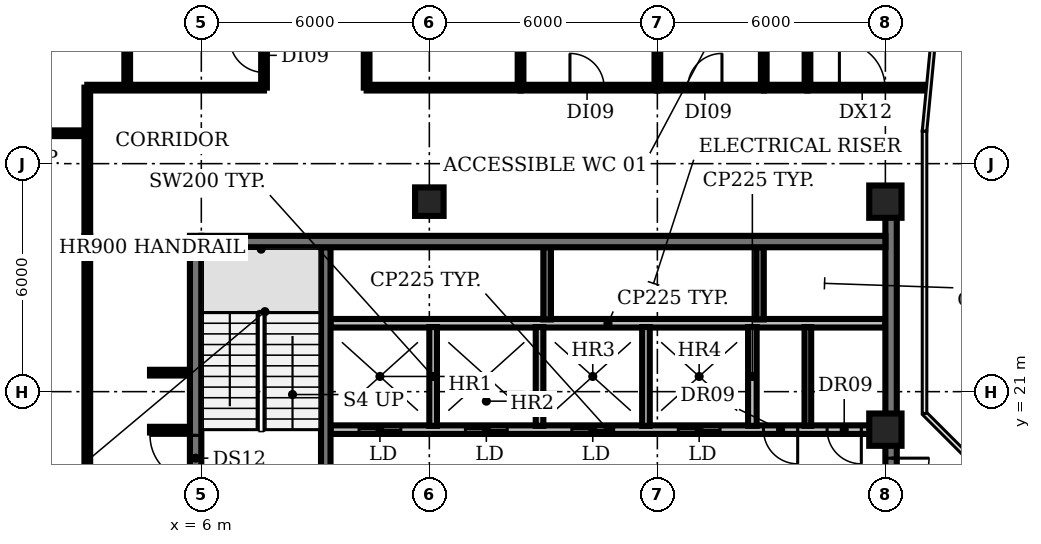
"""IFC4 building model, lengths in metres.
Left out: names, types, materials, properties, quantities, classifications, styles, units other than length and angle.
Written with IfcOpenShell. Run it as: python <this file> out.ifc"""

import sys

from ifc_helpers import new_model, si_unit, direction, frame, frame_2d, origin, origin_2d, place, context, subcontext, project, spatial, rectangle, circle, extrude, element, fill, save


model = new_model("IFC4")
c1 = context("Model", 3, precision=1e-05, world=origin(), true_north=direction((0.0, 1.0)))
c2 = subcontext(c1, "Body", "Model", "MODEL_VIEW")
j1 = project(units=[si_unit("LENGTHUNIT", "METRE"), si_unit("PLANEANGLEUNIT", "RADIAN")], contexts=[c1])
p1 = place(None, origin())
s1 = spatial("IfcSite", under=j1, at=p1, CompositionType="ELEMENT")
p2 = place(p1, origin())
s2 = spatial("IfcBuilding", under=s1, at=p2, CompositionType="ELEMENT")
p3 = place(p2, frame((0.0, 0.0, 264.2)))
s3 = spatial("IfcBuildingStorey", under=s2, at=p3, CompositionType="ELEMENT", Elevation=264.2)
p4 = place(p3, frame((12.0, 26.0, -0.35), z_axis=(0.0, 0.0, 1.0), x_axis=(1.0, 0.0, 0.0)))
e1 = element("IfcColumn", 1, at=p4, inside=s3, PredefinedType="COLUMN", context=c2, shape_type="SweptSolid", body=[
    extrude(rectangle(XDim=0.75, YDim=0.75, at=origin_2d()), origin(), (0.0, 0.0, 1.0), 4.2),
])
p5 = place(p3, frame((24.0, 20.0, 0.0), z_axis=(0.0, 0.0, 1.0), x_axis=(1.0, 0.0, 0.0)))
e2 = element("IfcColumn", 2, at=p5, inside=s3, PredefinedType="COLUMN", context=c2, shape_type="SweptSolid", body=[
    extrude(circle(Radius=0.425, at=origin_2d()), origin(), (0.0, 0.0, 1.0), 3.85),
])
p6 = place(p3, frame((24.0, 26.0, -0.35), z_axis=(0.0, 0.0, 1.0), x_axis=(1.0, 0.0, 0.0)))
e3 = element("IfcColumn", 3, at=p6, inside=s3, PredefinedType="COLUMN", context=c2, shape_type="SweptSolid", body=[
    extrude(rectangle(XDim=0.85, YDim=0.85, at=origin_2d()), origin(), (0.0, 0.0, 1.0), 4.2),
])
p7 = place(p3, frame((24.0, 20.0, 0.0), z_axis=(0.0, 0.0, 1.0), x_axis=(-1.0, 0.0, 0.0)))
e4 = element("IfcWall", 4, at=p7, inside=s3, PredefinedType="PARTITIONING", context=c2, shape_type="SweptSolid", body=[
    extrude(rectangle(XDim=14.6, YDim=0.225, at=frame_2d((7.3, 0.0))), origin(), (0.0, 0.0, 1.0), 3.85),
])
p8 = place(p7, frame((12.75, 0.0, 0.0)))
e5 = element("IfcOpeningElement", 5, at=p8, cuts=e4, PredefinedType="OPENING", context=c2, shape_type="SweptSolid", body=[
    extrude(rectangle(XDim=1.1, YDim=2.1, at=frame_2d((0.55, 1.05))), frame((0.0, 0.123, 0.0), z_axis=(0.0, -1.0, 0.0), x_axis=(1.0, 0.0, 0.0)), (0.0, 0.0, 1.0), 0.245),
])
p9 = place(p7, frame((9.95, 0.0, 0.0)))
e6 = element("IfcOpeningElement", 6, at=p9, cuts=e4, PredefinedType="OPENING", context=c2, shape_type="SweptSolid", body=[
    extrude(rectangle(XDim=1.1, YDim=2.1, at=frame_2d((0.55, 1.05))), frame((0.0, 0.123, 0.0), z_axis=(0.0, -1.0, 0.0), x_axis=(1.0, 0.0, 0.0)), (0.0, 0.0, 1.0), 0.245),
])
p10 = place(p7, frame((7.15, 0.0, 0.0)))
e7 = element("IfcOpeningElement", 7, at=p10, cuts=e4, PredefinedType="OPENING", context=c2, shape_type="SweptSolid", body=[
    extrude(rectangle(XDim=1.1, YDim=2.1, at=frame_2d((0.55, 1.05))), frame((0.0, 0.123, 0.0), z_axis=(0.0, -1.0, 0.0), x_axis=(1.0, 0.0, 0.0)), (0.0, 0.0, 1.0), 0.245),
])
p11 = place(p7, frame((4.35, 0.0, 0.0)))
e8 = element("IfcOpeningElement", 8, at=p11, cuts=e4, PredefinedType="OPENING", context=c2, shape_type="SweptSolid", body=[
    extrude(rectangle(XDim=1.1, YDim=2.1, at=frame_2d((0.55, 1.05))), frame((0.0, 0.123, 0.0), z_axis=(0.0, -1.0, 0.0), x_axis=(1.0, 0.0, 0.0)), (0.0, 0.0, 1.0), 0.245),
])
p12 = place(p7, frame((2.308, 0.0, 0.0)))
e9 = element("IfcOpeningElement", 9, at=p12, cuts=e4, PredefinedType="OPENING", context=c2, shape_type="SweptSolid", body=[
    extrude(rectangle(XDim=0.9, YDim=2.1, at=frame_2d((0.45, 1.05))), frame((0.0, 0.123, 0.0), z_axis=(0.0, -1.0, 0.0), x_axis=(1.0, 0.0, 0.0)), (0.0, 0.0, 1.0), 0.245),
])
p13 = place(p7, frame((0.633, 0.0, 0.0)))
e10 = element("IfcOpeningElement", 10, at=p13, cuts=e4, PredefinedType="OPENING", context=c2, shape_type="SweptSolid", body=[
    extrude(rectangle(XDim=0.9, YDim=2.1, at=frame_2d((0.45, 1.05))), frame((0.0, 0.123, 0.0), z_axis=(0.0, -1.0, 0.0), x_axis=(1.0, 0.0, 0.0)), (0.0, 0.0, 1.0), 0.245),
])
p14 = place(p3, frame((9.4, 22.8, 0.0), z_axis=(0.0, 0.0, 1.0), x_axis=(1.0, 0.0, 0.0)))
e11 = element("IfcWall", 11, at=p14, inside=s3, PredefinedType="PARTITIONING", context=c2, shape_type="SweptSolid", body=[
    extrude(rectangle(XDim=14.6, YDim=0.225, at=frame_2d((7.3, 0.0))), origin(), (0.0, 0.0, 1.0), 3.85),
])
p15 = place(p3, frame((9.275, 18.375, 0.0), z_axis=(0.0, 0.0, 1.0), x_axis=(0.0, 1.0, 0.0)))
e12 = element("IfcWall", 12, at=p15, inside=s3, PredefinedType="SHEAR", context=c2, shape_type="SweptSolid", body=[
    extrude(rectangle(XDim=6.425, YDim=0.25, at=frame_2d((3.212, 0.0))), origin(), (0.0, 0.0, 1.0), 3.85),
])
for number, where, z_axis, x_axis in (
    (13, (12.1, 20.1, 0.0), (0.0, 0.0, 1.0), (0.0, 1.0, 0.0)),
    (14, (14.9, 20.1, 0.0), (0.0, 0.0, 1.0), (0.0, 1.0, 0.0)),
):
    element("IfcWall", number, at=place(p3, frame(where, z_axis=z_axis, x_axis=x_axis)), inside=s3, PredefinedType="SOLIDWALL", context=c2, shape_type="SweptSolid", body=[
        extrude(rectangle(XDim=2.6, YDim=0.2, at=frame_2d((1.3, 0.0))), origin(), (0.0, 0.0, 1.0), 3.85),
    ])
p16 = place(p3, frame((15.1, 22.9, 0.0), z_axis=(0.0, 0.0, 1.0), x_axis=(0.0, 1.0, 0.0)))
e15 = element("IfcWall", 15, at=p16, inside=s3, PredefinedType="SHEAR", context=c2, shape_type="SweptSolid", body=[
    extrude(rectangle(XDim=1.9, YDim=0.2, at=frame_2d((0.95, 0.0))), origin(), (0.0, 0.0, 1.0), 3.85),
])
p17 = place(p3, frame((17.7, 20.1, 0.0), z_axis=(0.0, 0.0, 1.0), x_axis=(0.0, 1.0, 0.0)))
e16 = element("IfcWall", 16, at=p17, inside=s3, PredefinedType="SOLIDWALL", context=c2, shape_type="SweptSolid", body=[
    extrude(rectangle(XDim=2.6, YDim=0.2, at=frame_2d((1.3, 0.0))), origin(), (0.0, 0.0, 1.0), 3.85),
])
p18 = place(p3, frame((20.5, 20.1, 0.0), z_axis=(0.0, 0.0, 1.0), x_axis=(0.0, 1.0, 0.0)))
e17 = element("IfcWall", 17, at=p18, inside=s3, PredefinedType="PARTITIONING", context=c2, shape_type="SweptSolid", body=[
    extrude(rectangle(XDim=2.6, YDim=0.225, at=frame_2d((1.3, 0.0))), origin(), (0.0, 0.0, 1.0), 3.85),
])
p19 = place(p3, frame((20.7, 22.9, 0.0), z_axis=(0.0, 0.0, 1.0), x_axis=(0.0, 1.0, 0.0)))
e18 = element("IfcWall", 18, at=p19, inside=s3, PredefinedType="SHEAR", context=c2, shape_type="SweptSolid", body=[
    extrude(rectangle(XDim=1.9, YDim=0.2, at=frame_2d((0.95, 0.0))), origin(), (0.0, 0.0, 1.0), 3.85),
])
p20 = place(p3, frame((21.96, 20.1, 0.0), z_axis=(0.0, 0.0, 1.0), x_axis=(0.0, 1.0, 0.0)))
e19 = element("IfcWall", 19, at=p20, inside=s3, PredefinedType="PARTITIONING", context=c2, shape_type="SweptSolid", body=[
    extrude(rectangle(XDim=2.6, YDim=0.175, at=frame_2d((1.3, 0.0))), origin(), (0.0, 0.0, 1.0), 3.85),
])
p21 = place(p3, frame((5.85, 5.1, 0.0), z_axis=(0.0, 0.0, 1.0), x_axis=(0.0, 1.0, 0.0)))
e20 = element("IfcWall", 20, at=p21, inside=s3, PredefinedType="SHEAR", context=c2, shape_type="SweptSolid", body=[
    extrude(rectangle(XDim=20.0, YDim=0.3, at=frame_2d((10.0, 0.0))), origin(), (0.0, 0.0, 1.0), 3.85),
])
p22 = place(p21, frame((0.55, 0.0, 0.0)))
e21 = element("IfcOpeningElement", 21, at=p22, cuts=e20, PredefinedType="OPENING", context=c2, shape_type="SweptSolid", body=[
    extrude(rectangle(XDim=1.5, YDim=2.1, at=frame_2d((0.75, 1.05))), frame((0.0, 0.16, 0.0), z_axis=(0.0, -1.0, 0.0), x_axis=(1.0, 0.0, 0.0)), (0.0, 0.0, 1.0), 0.32),
])
p23 = place(p21, frame((7.0, 0.0, 0.0)))
e22 = element("IfcOpeningElement", 22, at=p23, cuts=e20, PredefinedType="OPENING", context=c2, shape_type="SweptSolid", body=[
    extrude(rectangle(XDim=1.2, YDim=2.1, at=frame_2d((0.6, 1.05))), frame((0.0, 0.16, 0.0), z_axis=(0.0, -1.0, 0.0), x_axis=(1.0, 0.0, 0.0)), (0.0, 0.0, 1.0), 0.32),
])
p24 = place(p21, frame((13.55, 0.0, 0.0)))
e23 = element("IfcOpeningElement", 23, at=p24, cuts=e20, PredefinedType="OPENING", context=c2, shape_type="SweptSolid", body=[
    extrude(rectangle(XDim=1.2, YDim=2.1, at=frame_2d((0.6, 1.05))), frame((0.0, 0.16, 0.0), z_axis=(0.0, -1.0, 0.0), x_axis=(1.0, 0.0, 0.0)), (0.0, 0.0, 1.0), 0.32),
])
p25 = place(p3, frame((24.15, 25.605, 0.0), z_axis=(0.0, 0.0, 1.0), x_axis=(0.0, -1.0, 0.0)))
e24 = element("IfcWall", 24, at=p25, inside=s3, PredefinedType="SHEAR", context=c2, shape_type="SweptSolid", body=[
    extrude(rectangle(XDim=20.505, YDim=0.3, at=frame_2d((10.252, 0.0))), origin(), (0.0, 0.0, 1.0), 3.85),
])
p26 = place(p25, frame((18.455, 0.0, 0.0)))
e25 = element("IfcOpeningElement", 25, at=p26, cuts=e24, PredefinedType="OPENING", context=c2, shape_type="SweptSolid", body=[
    extrude(rectangle(XDim=1.5, YDim=2.1, at=frame_2d((0.75, 1.05))), frame((0.0, 0.16, 0.0), z_axis=(0.0, -1.0, 0.0), x_axis=(1.0, 0.0, 0.0)), (0.0, 0.0, 1.0), 0.32),
])
p27 = place(p25, frame((12.355, 0.0, 0.0)))
e26 = element("IfcOpeningElement", 26, at=p27, cuts=e24, PredefinedType="OPENING", context=c2, shape_type="SweptSolid", body=[
    extrude(rectangle(XDim=0.9, YDim=2.1, at=frame_2d((0.45, 1.05))), frame((0.0, 0.16, 0.0), z_axis=(0.0, -1.0, 0.0), x_axis=(1.0, 0.0, 0.0)), (0.0, 0.0, 1.0), 0.32),
])
p28 = place(p25, frame((6.355, 0.0, 0.0)))
e27 = element("IfcOpeningElement", 27, at=p28, cuts=e24, PredefinedType="OPENING", context=c2, shape_type="SweptSolid", body=[
    extrude(rectangle(XDim=2.0, YDim=2.1, at=frame_2d((1.0, 1.05))), frame((0.0, 0.16, 0.0), z_axis=(0.0, -1.0, 0.0), x_axis=(1.0, 0.0, 0.0)), (0.0, 0.0, 1.0), 0.32),
])
p29 = place(p3, frame((6.0, 24.95, 0.0), z_axis=(0.0, 0.0, 1.0), x_axis=(1.0, 0.0, 0.0)))
e28 = element("IfcWall", 28, at=p29, inside=s3, PredefinedType="SHEAR", context=c2, shape_type="SweptSolid", body=[
    extrude(rectangle(XDim=18.0, YDim=0.3, at=frame_2d((9.0, 0.0))), origin(), (0.0, 0.0, 1.0), 3.85),
])
p30 = place(p3, frame((-1.11, 27.8, 0.0), z_axis=(0.0, 0.0, 1.0), x_axis=(1.0, 0.0, 0.0)))
e29 = element("IfcWall", 29, at=p30, inside=s3, PredefinedType="PARTITIONING", context=c2, shape_type="SweptSolid", body=[
    extrude(rectangle(XDim=4.11, YDim=0.15, at=frame_2d((2.055, 0.0))), origin(), (0.0, 0.0, 1.0), 2.9),
])
p31 = place(p3, frame((3.0, 5.1, 0.0), z_axis=(0.0, 0.0, 1.0), x_axis=(0.0, 1.0, 0.0)))
e30 = element("IfcWall", 30, at=p31, inside=s3, PredefinedType="PARTITIONING", context=c2, shape_type="SweptSolid", body=[
    extrude(rectangle(XDim=20.0, YDim=0.15, at=frame_2d((10.0, 0.0))), origin(), (0.0, 0.0, 1.0), 2.9),
])
p32 = place(p31, frame((9.3, 0.0, 0.0)))
e31 = element("IfcOpeningElement", 31, at=p32, cuts=e30, PredefinedType="OPENING", context=c2, shape_type="SweptSolid", body=[
    extrude(rectangle(XDim=1.2, YDim=2.1, at=frame_2d((0.6, 1.05))), frame((0.0, 0.085, 0.0), z_axis=(0.0, -1.0, 0.0), x_axis=(1.0, 0.0, 0.0)), (0.0, 0.0, 1.0), 0.17),
])
p33 = place(p3, frame((3.0, 25.1, 0.0), z_axis=(0.0, 0.0, 1.0), x_axis=(0.0, 1.0, 0.0)))
e32 = element("IfcWall", 32, at=p33, inside=s3, PredefinedType="PARTITIONING", context=c2, shape_type="SweptSolid", body=[
    extrude(rectangle(XDim=3.9, YDim=0.15, at=frame_2d((1.95, 0.0))), origin(), (0.0, 0.0, 1.0), 2.9),
])
p34 = place(p3, frame((3.0, 29.0, 0.0), z_axis=(0.0, 0.0, 1.0), x_axis=(1.0, 0.0, 0.0)))
e33 = element("IfcWall", 33, at=p34, inside=s3, PredefinedType="PARTITIONING", context=c2, shape_type="SweptSolid", body=[
    extrude(rectangle(XDim=4.65, YDim=0.15, at=frame_2d((2.325, 0.0))), origin(), (0.0, 0.0, 1.0), 2.9),
])
p35 = place(p3, frame((4.05, 29.0, 0.0), z_axis=(0.0, 0.0, 1.0), x_axis=(0.0, 1.0, 0.0)))
e34 = element("IfcWall", 34, at=p35, inside=s3, PredefinedType="PARTITIONING", context=c2, shape_type="SweptSolid", body=[
    extrude(rectangle(XDim=4.8, YDim=0.15, at=frame_2d((2.4, 0.0))), origin(), (0.0, 0.0, 1.0), 2.9),
])
for number, where, z_axis, x_axis in (
    (35, (4.65, 20.0, 0.0), (0.0, 0.0, 1.0), (1.0, 0.0, 0.0)),
    (36, (4.65, 21.5, 0.0), (0.0, 0.0, 1.0), (1.0, 0.0, 0.0)),
):
    element("IfcWall", number, at=place(p3, frame(where, z_axis=z_axis, x_axis=x_axis)), inside=s3, PredefinedType="PARTITIONING", context=c2, shape_type="SweptSolid", body=[
        extrude(rectangle(XDim=1.05, YDim=0.15, at=frame_2d((0.525, 0.0))), origin(), (0.0, 0.0, 1.0), 2.9),
    ])
p36 = place(p3, frame((7.65, 29.0, 0.0), z_axis=(0.0, 0.0, 1.0), x_axis=(0.0, 1.0, 0.0)))
e37 = element("IfcWall", 37, at=p36, inside=s3, PredefinedType="PARTITIONING", context=c2, shape_type="SweptSolid", body=[
    extrude(rectangle(XDim=4.8, YDim=0.15, at=frame_2d((2.4, 0.0))), origin(), (0.0, 0.0, 1.0), 2.9),
])
p37 = place(p36, frame((0.4, 0.0, 0.0)))
e38 = element("IfcOpeningElement", 38, at=p37, cuts=e37, PredefinedType="OPENING", context=c2, shape_type="SweptSolid", body=[
    extrude(rectangle(XDim=0.9, YDim=2.1, at=frame_2d((0.45, 1.05))), frame((0.0, 0.085, 0.0), z_axis=(0.0, -1.0, 0.0), x_axis=(1.0, 0.0, 0.0)), (0.0, 0.0, 1.0), 0.17),
])
p38 = place(p3, frame((10.35, 29.0, 0.0), z_axis=(0.0, 0.0, 1.0), x_axis=(0.0, 1.0, 0.0)))
e39 = element("IfcWall", 39, at=p38, inside=s3, PredefinedType="PARTITIONING", context=c2, shape_type="SweptSolid", body=[
    extrude(rectangle(XDim=4.8, YDim=0.15, at=frame_2d((2.4, 0.0))), origin(), (0.0, 0.0, 1.0), 2.9),
])
p39 = place(p3, frame((10.35, 29.0, 0.0), z_axis=(0.0, 0.0, 1.0), x_axis=(1.0, 0.0, 0.0)))
e40 = element("IfcWall", 40, at=p39, inside=s3, PredefinedType="PARTITIONING", context=c2, shape_type="SweptSolid", body=[
    extrude(rectangle(XDim=4.05, YDim=0.15, at=frame_2d((2.025, 0.0))), origin(), (0.0, 0.0, 1.0), 2.9),
])
p40 = place(p3, frame((14.4, 29.0, 0.0), z_axis=(0.0, 0.0, 1.0), x_axis=(0.0, 1.0, 0.0)))
e41 = element("IfcWall", 41, at=p40, inside=s3, PredefinedType="PARTITIONING", context=c2, shape_type="SweptSolid", body=[
    extrude(rectangle(XDim=4.8, YDim=0.15, at=frame_2d((2.4, 0.0))), origin(), (0.0, 0.0, 1.0), 2.9),
])
p41 = place(p3, frame((14.4, 29.0, 0.0), z_axis=(0.0, 0.0, 1.0), x_axis=(1.0, 0.0, 0.0)))
e42 = element("IfcWall", 42, at=p41, inside=s3, PredefinedType="PARTITIONING", context=c2, shape_type="SweptSolid", body=[
    extrude(rectangle(XDim=3.6, YDim=0.15, at=frame_2d((1.8, 0.0))), origin(), (0.0, 0.0, 1.0), 2.9),
])
p42 = place(p41, frame((1.3, 0.0, 0.0)))
e43 = element("IfcOpeningElement", 43, at=p42, cuts=e42, PredefinedType="OPENING", context=c2, shape_type="SweptSolid", body=[
    extrude(rectangle(XDim=0.9, YDim=2.1, at=frame_2d((0.45, 1.05))), frame((0.0, 0.085, 0.0), z_axis=(0.0, -1.0, 0.0), x_axis=(1.0, 0.0, 0.0)), (0.0, 0.0, 1.0), 0.17),
])
p43 = place(p3, frame((18.0, 29.0, 0.0), z_axis=(0.0, 0.0, 1.0), x_axis=(0.0, 1.0, 0.0)))
e44 = element("IfcWall", 44, at=p43, inside=s3, PredefinedType="PARTITIONING", context=c2, shape_type="SweptSolid", body=[
    extrude(rectangle(XDim=4.8, YDim=0.15, at=frame_2d((2.4, 0.0))), origin(), (0.0, 0.0, 1.0), 2.9),
])
p44 = place(p3, frame((18.0, 29.0, 0.0), z_axis=(0.0, 0.0, 1.0), x_axis=(1.0, 0.0, 0.0)))
e45 = element("IfcWall", 45, at=p44, inside=s3, PredefinedType="PARTITIONING", context=c2, shape_type="SweptSolid", body=[
    extrude(rectangle(XDim=2.8, YDim=0.15, at=frame_2d((1.4, 0.0))), origin(), (0.0, 0.0, 1.0), 2.9),
])
p45 = place(p44, frame((0.8, 0.0, 0.0)))
e46 = element("IfcOpeningElement", 46, at=p45, cuts=e45, PredefinedType="OPENING", context=c2, shape_type="SweptSolid", body=[
    extrude(rectangle(XDim=0.9, YDim=2.1, at=frame_2d((0.45, 1.05))), frame((0.0, 0.085, 0.0), z_axis=(0.0, -1.0, 0.0), x_axis=(1.0, 0.0, 0.0)), (0.0, 0.0, 1.0), 0.17),
])
p46 = place(p3, frame((20.8, 29.0, 0.0), z_axis=(0.0, 0.0, 1.0), x_axis=(0.0, 1.0, 0.0)))
e47 = element("IfcWall", 47, at=p46, inside=s3, PredefinedType="PARTITIONING", context=c2, shape_type="SweptSolid", body=[
    extrude(rectangle(XDim=4.8, YDim=0.15, at=frame_2d((2.4, 0.0))), origin(), (0.0, 0.0, 1.0), 2.9),
])
p47 = place(p3, frame((20.8, 29.0, 0.0), z_axis=(0.0, 0.0, 1.0), x_axis=(1.0, 0.0, 0.0)))
e48 = element("IfcWall", 48, at=p47, inside=s3, PredefinedType="PARTITIONING", context=c2, shape_type="SweptSolid", body=[
    extrude(rectangle(XDim=1.15, YDim=0.15, at=frame_2d((0.575, 0.0))), origin(), (0.0, 0.0, 1.0), 2.9),
])
p48 = place(p3, frame((21.95, 29.0, 0.0), z_axis=(0.0, 0.0, 1.0), x_axis=(0.0, 1.0, 0.0)))
e49 = element("IfcWall", 49, at=p48, inside=s3, PredefinedType="PARTITIONING", context=c2, shape_type="SweptSolid", body=[
    extrude(rectangle(XDim=4.8, YDim=0.15, at=frame_2d((2.4, 0.0))), origin(), (0.0, 0.0, 1.0), 2.9),
])
p49 = place(p3, frame((21.95, 29.0, 0.0), z_axis=(0.0, 0.0, 1.0), x_axis=(1.0, 0.0, 0.0)))
e50 = element("IfcWall", 50, at=p49, inside=s3, PredefinedType="PARTITIONING", context=c2, shape_type="SweptSolid", body=[
    extrude(rectangle(XDim=3.14, YDim=0.15, at=frame_2d((1.57, 0.0))), origin(), (0.0, 0.0, 1.0), 2.9),
])
p50 = place(p49, frame((0.84, 0.0, 0.0)))
e51 = element("IfcOpeningElement", 51, at=p50, cuts=e50, PredefinedType="OPENING", context=c2, shape_type="SweptSolid", body=[
    extrude(rectangle(XDim=1.2, YDim=2.1, at=frame_2d((0.6, 1.05))), frame((0.0, 0.085, 0.0), z_axis=(0.0, -1.0, 0.0), x_axis=(1.0, 0.0, 0.0)), (0.0, 0.0, 1.0), 0.17),
])
p51 = place(p8, origin())
e52 = element("IfcDoor", 52, at=p51, inside=s3, OperationType="DOUBLE_DOOR_SLIDING", PredefinedType="DOOR", context=c2, shape_type="SweptSolid", body=[
    extrude(rectangle(XDim=1.1, YDim=2.1, at=frame_2d((0.55, 1.05))), frame((0.0, 0.025, 0.0), z_axis=(0.0, -1.0, 0.0), x_axis=(1.0, 0.0, 0.0)), (0.0, 0.0, 1.0), 0.05),
])
fill(e5, e52)
p52 = place(p9, origin())
e53 = element("IfcDoor", 53, at=p52, inside=s3, OperationType="DOUBLE_DOOR_SLIDING", PredefinedType="DOOR", context=c2, shape_type="SweptSolid", body=[
    extrude(rectangle(XDim=1.1, YDim=2.1, at=frame_2d((0.55, 1.05))), frame((0.0, 0.025, 0.0), z_axis=(0.0, -1.0, 0.0), x_axis=(1.0, 0.0, 0.0)), (0.0, 0.0, 1.0), 0.05),
])
fill(e6, e53)
p53 = place(p10, origin())
e54 = element("IfcDoor", 54, at=p53, inside=s3, OperationType="DOUBLE_DOOR_SLIDING", PredefinedType="DOOR", context=c2, shape_type="SweptSolid", body=[
    extrude(rectangle(XDim=1.1, YDim=2.1, at=frame_2d((0.55, 1.05))), frame((0.0, 0.025, 0.0), z_axis=(0.0, -1.0, 0.0), x_axis=(1.0, 0.0, 0.0)), (0.0, 0.0, 1.0), 0.05),
])
fill(e7, e54)
p54 = place(p11, origin())
e55 = element("IfcDoor", 55, at=p54, inside=s3, OperationType="DOUBLE_DOOR_SLIDING", PredefinedType="DOOR", context=c2, shape_type="SweptSolid", body=[
    extrude(rectangle(XDim=1.1, YDim=2.1, at=frame_2d((0.55, 1.05))), frame((0.0, 0.025, 0.0), z_axis=(0.0, -1.0, 0.0), x_axis=(1.0, 0.0, 0.0)), (0.0, 0.0, 1.0), 0.05),
])
fill(e8, e55)
p55 = place(p12, origin())
e56 = element("IfcDoor", 56, at=p55, inside=s3, OperationType="SINGLE_SWING_LEFT", PredefinedType="DOOR", context=c2, shape_type="SweptSolid", body=[
    extrude(rectangle(XDim=0.9, YDim=2.1, at=frame_2d((0.45, 1.05))), frame((0.0, 0.025, 0.0), z_axis=(0.0, -1.0, 0.0), x_axis=(1.0, 0.0, 0.0)), (0.0, 0.0, 1.0), 0.05),
])
fill(e9, e56)
p56 = place(p13, origin())
e57 = element("IfcDoor", 57, at=p56, inside=s3, OperationType="SINGLE_SWING_LEFT", PredefinedType="DOOR", context=c2, shape_type="SweptSolid", body=[
    extrude(rectangle(XDim=0.9, YDim=2.1, at=frame_2d((0.45, 1.05))), frame((0.0, 0.025, 0.0), z_axis=(0.0, -1.0, 0.0), x_axis=(1.0, 0.0, 0.0)), (0.0, 0.0, 1.0), 0.05),
])
fill(e10, e57)
p57 = place(p24, origin())
e58 = element("IfcDoor", 58, at=p57, inside=s3, OperationType="SINGLE_SWING_RIGHT", PredefinedType="DOOR", context=c2, shape_type="SweptSolid", body=[
    extrude(rectangle(XDim=1.2, YDim=2.1, at=frame_2d((0.6, 1.05))), frame((0.0, 0.025, 0.0), z_axis=(0.0, -1.0, 0.0), x_axis=(1.0, 0.0, 0.0)), (0.0, 0.0, 1.0), 0.05),
])
fill(e23, e58)
p58 = place(p28, origin())
e59 = element("IfcDoor", 59, at=p58, inside=s3, OperationType="DOUBLE_DOOR_SINGLE_SWING", PredefinedType="DOOR", context=c2, shape_type="SweptSolid", body=[
    extrude(rectangle(XDim=2.0, YDim=2.1, at=frame_2d((1.0, 1.05))), frame((0.0, 0.025, 0.0), z_axis=(0.0, -1.0, 0.0), x_axis=(1.0, 0.0, 0.0)), (0.0, 0.0, 1.0), 0.05),
])
fill(e27, e59)
p59 = place(p37, origin())
e60 = element("IfcDoor", 60, at=p59, inside=s3, OperationType="SINGLE_SWING_RIGHT", PredefinedType="DOOR", context=c2, shape_type="SweptSolid", body=[
    extrude(rectangle(XDim=0.9, YDim=2.1, at=frame_2d((0.45, 1.05))), frame((0.0, 0.025, 0.0), z_axis=(0.0, -1.0, 0.0), x_axis=(1.0, 0.0, 0.0)), (0.0, 0.0, 1.0), 0.05),
])
fill(e38, e60)
p60 = place(p42, origin())
e61 = element("IfcDoor", 61, at=p60, inside=s3, OperationType="SINGLE_SWING_LEFT", PredefinedType="DOOR", context=c2, shape_type="SweptSolid", body=[
    extrude(rectangle(XDim=0.9, YDim=2.1, at=frame_2d((0.45, 1.05))), frame((0.0, 0.025, 0.0), z_axis=(0.0, -1.0, 0.0), x_axis=(1.0, 0.0, 0.0)), (0.0, 0.0, 1.0), 0.05),
])
fill(e43, e61)
p61 = place(p45, origin())
e62 = element("IfcDoor", 62, at=p61, inside=s3, OperationType="SINGLE_SWING_RIGHT", PredefinedType="DOOR", context=c2, shape_type="SweptSolid", body=[
    extrude(rectangle(XDim=0.9, YDim=2.1, at=frame_2d((0.45, 1.05))), frame((0.0, 0.025, 0.0), z_axis=(0.0, -1.0, 0.0), x_axis=(1.0, 0.0, 0.0)), (0.0, 0.0, 1.0), 0.05),
])
fill(e46, e62)
p62 = place(p50, origin())
e63 = element("IfcDoor", 63, at=p62, inside=s3, OperationType="SINGLE_SWING_LEFT", PredefinedType="DOOR", context=c2, shape_type="SweptSolid", body=[
    extrude(rectangle(XDim=1.2, YDim=2.1, at=frame_2d((0.6, 1.05))), frame((0.0, 0.025, 0.0), z_axis=(0.0, -1.0, 0.0), x_axis=(1.0, 0.0, 0.0)), (0.0, 0.0, 1.0), 0.05),
])
fill(e51, e63)
save(model, sys.argv[1])
